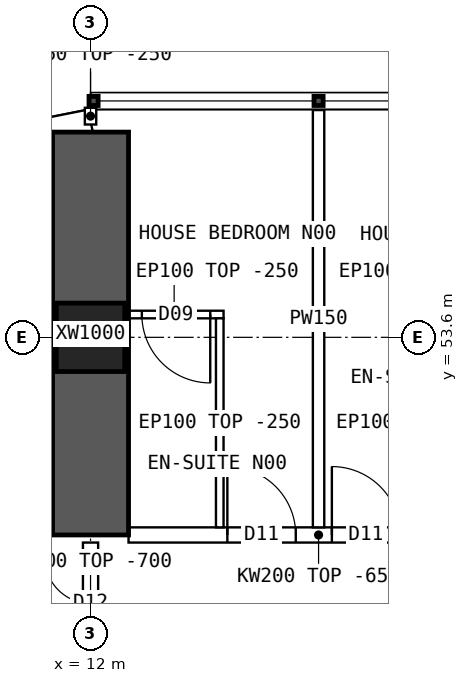
"""IFC4 building model, lengths in metres.
Left out: names, types, materials, properties, quantities, classifications, styles, units other than length and angle.
Written with IfcOpenShell. Run it as: python <this file> out.ifc"""

import sys

from ifc_helpers import new_model, si_unit, direction, frame, frame_2d, origin, origin_2d, place, context, subcontext, project, spatial, polyline, rectangle, hollow_rectangle, outline, extrude, element, fill, save


model = new_model("IFC4")
c1 = context("Model", 3, precision=1e-05, world=origin(), true_north=direction((0.0, 1.0)))
c2 = subcontext(c1, "Body", "Model", "MODEL_VIEW")
j1 = project(units=[si_unit("LENGTHUNIT", "METRE"), si_unit("PLANEANGLEUNIT", "RADIAN")], contexts=[c1])
p1 = place(None, origin())
s1 = spatial("IfcSite", under=j1, at=p1, CompositionType="ELEMENT")
p2 = place(p1, origin())
s2 = spatial("IfcBuilding", under=s1, at=p2, CompositionType="ELEMENT")
p3 = place(p2, frame((0.0, 0.0, 42.7)))
s3 = spatial("IfcBuildingStorey", under=s2, at=p3, CompositionType="ELEMENT", Elevation=42.7)
p4 = place(p3, frame((12.0, 53.6, 0.0), z_axis=(0.0, 0.0, 1.0), x_axis=(1.0, 0.0, 0.0)))
e1 = element("IfcColumn", 1, at=p4, inside=s3, PredefinedType="COLUMN", context=c2, shape_type="SweptSolid", body=[
    extrude(hollow_rectangle(XDim=0.9, YDim=0.9, WallThickness=0.09, at=origin_2d()), origin(), (0.0, 0.0, 1.0), 3.75),
])
p5 = place(p3, frame((12.0, 51.0, 0.0), z_axis=(0.0, 0.0, 1.0), x_axis=(0.0, 1.0, 0.0)))
e2 = element("IfcWall", 2, at=p5, inside=s3, PredefinedType="SHEAR", context=c2, shape_type="SweptSolid", body=[
    extrude(rectangle(XDim=5.3, YDim=1.0, at=frame_2d((2.65, 0.0))), origin(), (0.0, 0.0, 1.0), 3.75),
])
p6 = place(p3, frame((12.0, 56.45, 0.0), z_axis=(0.0, 0.0, 1.0), x_axis=(-0.980787251524, -0.195080412259, 0.0)))
e3 = element("IfcWall", 3, at=p6, inside=s3, PredefinedType="SOLIDWALL", context=c2, shape_type="SweptSolid", body=[
    extrude(outline(polyline([(-0.03, -0.15), (3.249, -0.15), (3.189, 0.15), (0.03, 0.15), (-0.03, -0.15)])), origin(), (0.0, 0.0, 1.0), 3.5),
])
p7 = place(p6, frame((0.909, 0.0, 0.9)))
e4 = element("IfcOpeningElement", 4, at=p7, cuts=e3, PredefinedType="OPENING", context=c2, shape_type="SweptSolid", body=[
    extrude(rectangle(XDim=1.4, YDim=1.8, at=frame_2d((0.7, 0.9))), frame((0.0, 0.16, 0.0), z_axis=(0.0, -1.0, 0.0), x_axis=(1.0, 0.0, 0.0)), (0.0, 0.0, 1.0), 0.32),
])
p8 = place(p3, frame((12.5, 51.0, 0.0), z_axis=(0.0, 0.0, 1.0), x_axis=(1.0, 0.0, 0.0)))
e5 = element("IfcWall", 5, at=p8, inside=s3, PredefinedType="SOLIDWALL", context=c2, shape_type="SweptSolid", body=[
    extrude(outline(polyline([(0.0, 0.0), (5.0, 0.0), (5.0, 3.1), (0.0, 3.1), (0.0, 0.0)])), frame((0.0, 0.1, 0.0), z_axis=(0.0, -1.0, 0.0), x_axis=(1.0, 0.0, 0.0)), (0.0, 0.0, 1.0), 0.2),
])
p9 = place(p8, frame((1.3, 0.0, 0.0)))
e6 = element("IfcOpeningElement", 6, at=p9, cuts=e5, PredefinedType="OPENING", context=c2, shape_type="SweptSolid", body=[
    extrude(rectangle(XDim=0.9, YDim=2.1, at=frame_2d((0.45, 1.05))), frame((0.0, 0.11, 0.0), z_axis=(0.0, -1.0, 0.0), x_axis=(1.0, 0.0, 0.0)), (0.0, 0.0, 1.0), 0.22),
])
p10 = place(p8, frame((2.675, 0.0, 0.0)))
e7 = element("IfcOpeningElement", 7, at=p10, cuts=e5, PredefinedType="OPENING", context=c2, shape_type="SweptSolid", body=[
    extrude(rectangle(XDim=0.9, YDim=2.1, at=frame_2d((0.45, 1.05))), frame((0.0, 0.11, 0.0), z_axis=(0.0, -1.0, 0.0), x_axis=(1.0, 0.0, 0.0)), (0.0, 0.0, 1.0), 0.22),
])
p11 = place(p3, frame((15.0, 56.59, 0.0), z_axis=(0.0, 0.0, 1.0), x_axis=(0.0, -1.0, 0.0)))
e8 = element("IfcWall", 8, at=p11, inside=s3, PredefinedType="PARTITIONING", context=c2, shape_type="SweptSolid", body=[
    extrude(outline(polyline([(0.0, 0.0), (5.49, 0.0), (5.49, 3.1), (5.442, 3.1), (5.44, 3.5), (3.192, 3.5), (3.19, 3.1), (2.792, 3.1), (2.79, 3.5), (0.0, 3.5), (0.0, 0.0)])), frame((0.0, 0.075, 0.0), z_axis=(0.0, -1.0, 0.0), x_axis=(1.0, 0.0, 0.0)), (0.0, 0.0, 1.0), 0.15),
])
p12 = place(p3, frame((12.45, 53.9, 0.0), z_axis=(0.0, 0.0, 1.0), x_axis=(1.0, 0.0, 0.0)))
e9 = element("IfcWall", 9, at=p12, inside=s3, PredefinedType="PARTITIONING", context=c2, shape_type="SweptSolid", body=[
    extrude(rectangle(XDim=1.3, YDim=0.1, at=frame_2d((0.65, 0.0))), origin(), (0.0, 0.0, 1.0), 3.5),
])
p13 = place(p12, frame((0.225, 0.0, 0.0)))
e10 = element("IfcOpeningElement", 10, at=p13, cuts=e9, PredefinedType="OPENING", context=c2, shape_type="SweptSolid", body=[
    extrude(rectangle(XDim=0.9, YDim=2.1, at=frame_2d((0.45, 1.05))), frame((0.0, 0.06, 0.0), z_axis=(0.0, -1.0, 0.0), x_axis=(1.0, 0.0, 0.0)), (0.0, 0.0, 1.0), 0.12),
])
p14 = place(p3, frame((13.7, 53.85, 0.0), z_axis=(0.0, 0.0, 1.0), x_axis=(0.0, -1.0, 0.0)))
e11 = element("IfcWall", 11, at=p14, inside=s3, PredefinedType="PARTITIONING", context=c2, shape_type="SweptSolid", body=[
    extrude(outline(polyline([(0.0, 0.0), (2.75, 0.0), (2.75, 3.1), (2.702, 3.1), (2.7, 3.5), (0.452, 3.5), (0.45, 3.1), (0.0, 3.1), (0.0, 0.0)])), frame((0.0, 0.05, 0.0), z_axis=(0.0, -1.0, 0.0), x_axis=(1.0, 0.0, 0.0)), (0.0, 0.0, 1.0), 0.1),
])
p15 = place(p3, frame((12.0, 49.3, 0.0), z_axis=(0.0, 0.0, 1.0), x_axis=(0.0, 1.0, 0.0)))
e12 = element("IfcWall", 12, at=p15, inside=s3, PredefinedType="SOLIDWALL", context=c2, shape_type="SweptSolid", body=[
    extrude(outline(polyline([(0.0, 0.0), (1.6, 0.0), (1.6, 3.05), (0.0, 3.05), (0.0, 0.0)])), frame((0.0, 0.1, 0.0), z_axis=(0.0, -1.0, 0.0), x_axis=(1.0, 0.0, 0.0)), (0.0, 0.0, 1.0), 0.2),
])
p16 = place(p15, frame((0.2, 0.0, 0.0)))
e13 = element("IfcOpeningElement", 13, at=p16, cuts=e12, PredefinedType="OPENING", context=c2, shape_type="SweptSolid", body=[
    extrude(rectangle(XDim=1.2, YDim=2.1, at=frame_2d((0.6, 1.05))), frame((0.0, 0.11, 0.0), z_axis=(0.0, -1.0, 0.0), x_axis=(1.0, 0.0, 0.0)), (0.0, 0.0, 1.0), 0.22),
])
p17 = place(p3, frame((12.0, 56.4, 0.0), z_axis=(0.0, 0.0, 1.0), x_axis=(0.0, 1.0, 0.0)))
e14 = element("IfcWall", 14, at=p17, inside=s3, PredefinedType="PARTITIONING", context=c2, shape_type="SweptSolid", body=[
    extrude(rectangle(XDim=0.22, YDim=0.15, at=frame_2d((0.11, 0.0))), origin(), (0.0, 0.0, 1.0), 3.5),
])
p18 = place(p13, origin())
e15 = element("IfcDoor", 15, at=p18, inside=s3, OperationType="SINGLE_SWING_RIGHT", PredefinedType="DOOR", context=c2, shape_type="SweptSolid", body=[
    extrude(rectangle(XDim=0.9, YDim=2.1, at=frame_2d((0.45, 1.05))), frame((0.0, 0.025, 0.0), z_axis=(0.0, -1.0, 0.0), x_axis=(1.0, 0.0, 0.0)), (0.0, 0.0, 1.0), 0.05),
])
fill(e10, e15)
p19 = place(p9, origin())
e16 = element("IfcDoor", 16, at=p19, inside=s3, OperationType="SINGLE_SWING_LEFT", PredefinedType="DOOR", context=c2, shape_type="SweptSolid", body=[
    extrude(rectangle(XDim=0.9, YDim=2.1, at=frame_2d((0.45, 1.05))), frame((0.0, 0.025, 0.0), z_axis=(0.0, -1.0, 0.0), x_axis=(1.0, 0.0, 0.0)), (0.0, 0.0, 1.0), 0.05),
])
fill(e6, e16)
p20 = place(p10, origin())
e17 = element("IfcDoor", 17, at=p20, inside=s3, OperationType="SINGLE_SWING_LEFT", PredefinedType="DOOR", context=c2, shape_type="SweptSolid", body=[
    extrude(rectangle(XDim=0.9, YDim=2.1, at=frame_2d((0.45, 1.05))), frame((0.0, 0.025, 0.0), z_axis=(0.0, -1.0, 0.0), x_axis=(1.0, 0.0, 0.0)), (0.0, 0.0, 1.0), 0.05),
])
fill(e7, e17)
p21 = place(p16, origin())
e18 = element("IfcDoor", 18, at=p21, inside=s3, OperationType="DOUBLE_DOOR_SINGLE_SWING", PredefinedType="DOOR", context=c2, shape_type="SweptSolid", body=[
    extrude(rectangle(XDim=1.2, YDim=2.1, at=frame_2d((0.6, 1.05))), frame((0.0, 0.025, 0.0), z_axis=(0.0, -1.0, 0.0), x_axis=(1.0, 0.0, 0.0)), (0.0, 0.0, 1.0), 0.05),
])
fill(e13, e18)
save(model, sys.argv[1])
